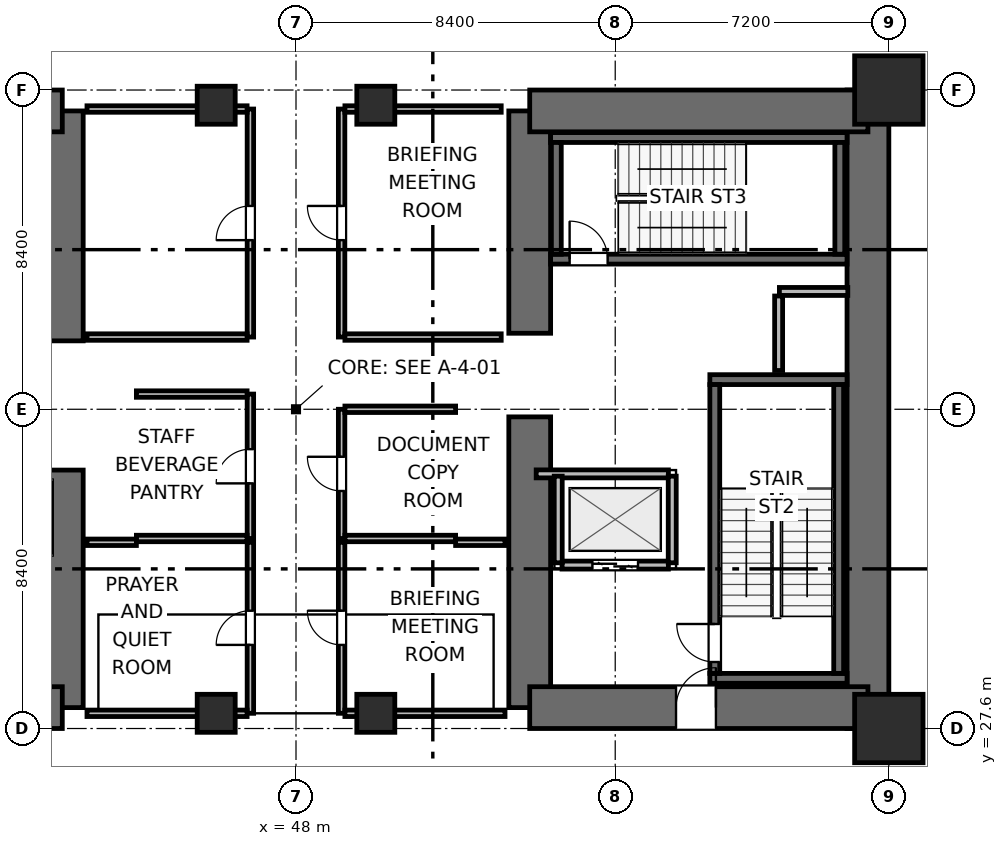
"""IFC4 building model, lengths in metres.
Left out: names, types, materials, properties, quantities, classifications, styles, units other than length and angle.
Written with IfcOpenShell. Run it as: python <this file> out.ifc"""

import sys

from ifc_helpers import new_model, si_unit, direction, frame, frame_2d, origin, origin_2d, place, context, subcontext, project, spatial, rectangle, extrude, element, fill, save


model = new_model("IFC4")
c1 = context("Model", 3, precision=1e-05, world=origin(), true_north=direction((0.0, 1.0)))
c2 = subcontext(c1, "Body", "Model", "MODEL_VIEW")
j1 = project(units=[si_unit("LENGTHUNIT", "METRE"), si_unit("PLANEANGLEUNIT", "RADIAN")], contexts=[c1])
p1 = place(None, origin())
s1 = spatial("IfcSite", under=j1, at=p1, CompositionType="ELEMENT")
p2 = place(p1, origin())
s2 = spatial("IfcBuilding", under=s1, at=p2, CompositionType="ELEMENT")
p3 = place(p2, frame((0.0, 0.0, -9.0)))
s3 = spatial("IfcBuildingStorey", under=s2, at=p3, CompositionType="ELEMENT", Elevation=-9.0)
p4 = place(p3, frame((41.85, 28.15, 0.0), z_axis=(0.0, 0.0, 1.0), x_axis=(0.0, 1.0, 0.0)))
e1 = element("IfcWall", 1, at=p4, inside=s3, PredefinedType="SHEAR", context=c2, shape_type="SweptSolid", body=[
    extrude(rectangle(XDim=6.25, YDim=1.1, at=frame_2d((3.125, 0.0))), origin(), (0.0, 0.0, 1.0), 4.5),
])
p5 = place(p3, frame((41.85, 37.8, 0.0), z_axis=(0.0, 0.0, 1.0), x_axis=(0.0, 1.0, 0.0)))
e2 = element("IfcWall", 2, at=p5, inside=s3, PredefinedType="SHEAR", context=c2, shape_type="SweptSolid", body=[
    extrude(rectangle(XDim=6.05, YDim=1.1, at=frame_2d((3.025, 0.0))), origin(), (0.0, 0.0, 1.0), 4.5),
])
p6 = place(p3, frame((32.95, 28.15, 0.0), z_axis=(0.0, 0.0, 1.0), x_axis=(1.0, 0.0, 0.0)))
e3 = element("IfcWall", 3, at=p6, inside=s3, PredefinedType="SHEAR", context=c2, shape_type="SweptSolid", body=[
    extrude(rectangle(XDim=8.9, YDim=1.1, at=frame_2d((4.45, 0.0))), origin(), (0.0, 0.0, 1.0), 4.5),
])
p7 = place(p6, frame((4.9, 0.0, 0.0)))
e4 = element("IfcOpeningElement", 4, at=p7, cuts=e3, PredefinedType="OPENING", context=c2, shape_type="SweptSolid", body=[
    extrude(rectangle(XDim=1.05, YDim=2.04, at=frame_2d((0.525, 1.02))), frame((0.0, 0.56, 0.0), z_axis=(0.0, -1.0, 0.0), x_axis=(1.0, 0.0, 0.0)), (0.0, 0.0, 1.0), 1.12),
])
p8 = place(p3, frame((32.95, 43.85, 0.0), z_axis=(0.0, 0.0, 1.0), x_axis=(1.0, 0.0, 0.0)))
e5 = element("IfcWall", 5, at=p8, inside=s3, PredefinedType="SHEAR", context=c2, shape_type="SweptSolid", body=[
    extrude(rectangle(XDim=8.9, YDim=1.1, at=frame_2d((4.45, 0.0))), origin(), (0.0, 0.0, 1.0), 4.5),
])
p9 = place(p3, frame((54.15, 28.15, 0.0), z_axis=(0.0, 0.0, 1.0), x_axis=(0.0, 1.0, 0.0)))
e6 = element("IfcWall", 6, at=p9, inside=s3, PredefinedType="SHEAR", context=c2, shape_type="SweptSolid", body=[
    extrude(rectangle(XDim=7.65, YDim=1.1, at=frame_2d((3.825, 0.0))), origin(), (0.0, 0.0, 1.0), 4.5),
])
p10 = place(p3, frame((54.15, 38.0, 0.0), z_axis=(0.0, 0.0, 1.0), x_axis=(0.0, 1.0, 0.0)))
e7 = element("IfcWall", 7, at=p10, inside=s3, PredefinedType="SHEAR", context=c2, shape_type="SweptSolid", body=[
    extrude(rectangle(XDim=5.85, YDim=1.1, at=frame_2d((2.925, 0.0))), origin(), (0.0, 0.0, 1.0), 4.5),
])
p11 = place(p3, frame((63.05, 27.6, 0.0), z_axis=(0.0, 0.0, 1.0), x_axis=(0.0, 1.0, 0.0)))
e8 = element("IfcWall", 8, at=p11, inside=s3, PredefinedType="SHEAR", context=c2, shape_type="SweptSolid", body=[
    extrude(rectangle(XDim=16.8, YDim=1.1, at=frame_2d((8.4, 0.0))), origin(), (0.0, 0.0, 1.0), 4.5),
])
p12 = place(p3, frame((54.15, 28.15, 0.0), z_axis=(0.0, 0.0, 1.0), x_axis=(1.0, 0.0, 0.0)))
e9 = element("IfcWall", 9, at=p12, inside=s3, PredefinedType="SHEAR", context=c2, shape_type="SweptSolid", body=[
    extrude(rectangle(XDim=8.9, YDim=1.1, at=frame_2d((4.45, 0.0))), origin(), (0.0, 0.0, 1.0), 4.5),
])
p13 = place(p12, frame((3.85, 0.0, 0.0)))
e10 = element("IfcOpeningElement", 10, at=p13, cuts=e9, PredefinedType="OPENING", context=c2, shape_type="SweptSolid", body=[
    extrude(rectangle(XDim=1.05, YDim=2.04, at=frame_2d((0.525, 1.02))), frame((0.0, 0.56, 0.0), z_axis=(0.0, -1.0, 0.0), x_axis=(1.0, 0.0, 0.0)), (0.0, 0.0, 1.0), 1.12),
])
p14 = place(p3, frame((54.15, 43.85, 0.0), z_axis=(0.0, 0.0, 1.0), x_axis=(1.0, 0.0, 0.0)))
e11 = element("IfcWall", 11, at=p14, inside=s3, PredefinedType="SHEAR", context=c2, shape_type="SweptSolid", body=[
    extrude(rectangle(XDim=8.9, YDim=1.1, at=frame_2d((4.45, 0.0))), origin(), (0.0, 0.0, 1.0), 4.5),
])
for number, where, z_axis, x_axis in (
    (12, (58.89, 28.92, 0.0), (0.0, 0.0, 1.0), (1.0, 0.0, 0.0)),
    (13, (58.89, 36.78, 0.0), (0.0, 0.0, 1.0), (1.0, 0.0, 0.0)),
):
    element("IfcWall", number, at=place(p3, frame(where, z_axis=z_axis, x_axis=x_axis)), inside=s3, PredefinedType="SHEAR", context=c2, shape_type="SweptSolid", body=[
        extrude(rectangle(XDim=3.61, YDim=0.26, at=frame_2d((1.805, 0.0))), origin(), (0.0, 0.0, 1.0), 4.5),
    ])
p15 = place(p3, frame((59.02, 29.05, 0.0), z_axis=(0.0, 0.0, 1.0), x_axis=(0.0, 1.0, 0.0)))
e14 = element("IfcWall", 14, at=p15, inside=s3, PredefinedType="SHEAR", context=c2, shape_type="SweptSolid", body=[
    extrude(rectangle(XDim=7.6, YDim=0.26, at=frame_2d((3.8, 0.0))), origin(), (0.0, 0.0, 1.0), 4.5),
])
p16 = place(p15, frame((0.3, 0.0, 0.0)))
e15 = element("IfcOpeningElement", 15, at=p16, cuts=e14, PredefinedType="OPENING", context=c2, shape_type="SweptSolid", body=[
    extrude(rectangle(XDim=1.0, YDim=2.04, at=frame_2d((0.5, 1.02))), frame((0.0, 0.14, 0.0), z_axis=(0.0, -1.0, 0.0), x_axis=(1.0, 0.0, 0.0)), (0.0, 0.0, 1.0), 0.28),
])
p17 = place(p3, frame((62.28, 29.05, 0.0), z_axis=(0.0, 0.0, 1.0), x_axis=(0.0, 1.0, 0.0)))
e16 = element("IfcWall", 16, at=p17, inside=s3, PredefinedType="SHEAR", context=c2, shape_type="SweptSolid", body=[
    extrude(rectangle(XDim=7.6, YDim=0.26, at=frame_2d((3.8, 0.0))), origin(), (0.0, 0.0, 1.0), 4.5),
])
p18 = place(p3, frame((54.7, 39.95, 0.0), z_axis=(0.0, 0.0, 1.0), x_axis=(1.0, 0.0, 0.0)))
e17 = element("IfcWall", 17, at=p18, inside=s3, PredefinedType="SHEAR", context=c2, shape_type="SweptSolid", body=[
    extrude(rectangle(XDim=7.8, YDim=0.26, at=frame_2d((3.9, 0.0))), origin(), (0.0, 0.0, 1.0), 4.5),
])
p19 = place(p18, frame((0.5, 0.0, 0.0)))
e18 = element("IfcOpeningElement", 18, at=p19, cuts=e17, PredefinedType="OPENING", context=c2, shape_type="SweptSolid", body=[
    extrude(rectangle(XDim=1.0, YDim=2.04, at=frame_2d((0.5, 1.02))), frame((0.0, 0.14, 0.0), z_axis=(0.0, -1.0, 0.0), x_axis=(1.0, 0.0, 0.0)), (0.0, 0.0, 1.0), 0.28),
])
p20 = place(p3, frame((54.7, 43.15, 0.0), z_axis=(0.0, 0.0, 1.0), x_axis=(1.0, 0.0, 0.0)))
e19 = element("IfcWall", 19, at=p20, inside=s3, PredefinedType="SHEAR", context=c2, shape_type="SweptSolid", body=[
    extrude(rectangle(XDim=7.8, YDim=0.26, at=frame_2d((3.9, 0.0))), origin(), (0.0, 0.0, 1.0), 4.5),
])
for number, where, z_axis, x_axis in (
    (20, (54.85, 40.08, 0.0), (0.0, 0.0, 1.0), (0.0, 1.0, 0.0)),
    (21, (62.31, 40.08, 0.0), (0.0, 0.0, 1.0), (0.0, 1.0, 0.0)),
):
    element("IfcWall", number, at=place(p3, frame(where, z_axis=z_axis, x_axis=x_axis)), inside=s3, PredefinedType="SHEAR", context=c2, shape_type="SweptSolid", body=[
        extrude(rectangle(XDim=2.94, YDim=0.26, at=frame_2d((1.47, 0.0))), origin(), (0.0, 0.0, 1.0), 4.5),
    ])
for number, where, z_axis, x_axis in (
    (22, (63.6, 27.6, 0.0), (0.0, 0.0, 1.0), (1.0, 0.0, 0.0)),
    (23, (63.6, 44.4, 0.0), (0.0, 0.0, 1.0), (1.0, 0.0, 0.0)),
):
    element("IfcColumn", number, at=place(p3, frame(where, z_axis=z_axis, x_axis=x_axis)), inside=s3, PredefinedType="COLUMN", context=c2, shape_type="SweptSolid", body=[
        extrude(rectangle(XDim=1.8, YDim=1.8, at=origin_2d()), origin(), (0.0, 0.0, 1.0), 4.5),
    ])
for number, where, z_axis, x_axis in (
    (24, (45.9, 28.0, 0.0), (0.0, 0.0, 1.0), (1.0, 0.0, 0.0)),
    (25, (50.1, 28.0, 0.0), (0.0, 0.0, 1.0), (1.0, 0.0, 0.0)),
    (26, (45.9, 44.0, 0.0), (0.0, 0.0, 1.0), (1.0, 0.0, 0.0)),
    (27, (50.1, 44.0, 0.0), (0.0, 0.0, 1.0), (1.0, 0.0, 0.0)),
):
    element("IfcColumn", number, at=place(p3, frame(where, z_axis=z_axis, x_axis=x_axis)), inside=s3, PredefinedType="COLUMN", context=c2, shape_type="SweptSolid", body=[
        extrude(rectangle(XDim=1.0, YDim=1.0, at=origin_2d()), origin(), (0.0, 0.0, 1.0), 4.5),
    ])
p21 = place(p3, frame((60.72, 39.1, 0.0), z_axis=(0.0, 0.0, 1.0), x_axis=(1.0, 0.0, 0.0)))
e28 = element("IfcWall", 28, at=p21, inside=s3, PredefinedType="PARTITIONING", context=c2, shape_type="SweptSolid", body=[
    extrude(rectangle(XDim=1.8, YDim=0.21, at=frame_2d((0.9, 0.0))), origin(), (0.0, 0.0, 1.0), 4.18),
])
p22 = place(p3, frame((60.7, 37.02, 0.0), z_axis=(0.0, 0.0, 1.0), x_axis=(0.0, 1.0, 0.0)))
e29 = element("IfcWall", 29, at=p22, inside=s3, PredefinedType="PARTITIONING", context=c2, shape_type="SweptSolid", body=[
    extrude(rectangle(XDim=1.96, YDim=0.21, at=frame_2d((0.98, 0.0))), origin(), (0.0, 0.0, 1.0), 4.18),
])
p23 = place(p3, frame((55.0, 31.9, 0.0), z_axis=(0.0, 0.0, 1.0), x_axis=(1.0, 0.0, 0.0)))
e30 = element("IfcWall", 30, at=p23, inside=s3, PredefinedType="PARTITIONING", context=c2, shape_type="SweptSolid", body=[
    extrude(rectangle(XDim=2.8, YDim=0.21, at=frame_2d((1.4, 0.0))), origin(), (0.0, 0.0, 1.0), 4.18),
])
p24 = place(p23, frame((0.8, 0.0, 0.0)))
e31 = element("IfcOpeningElement", 31, at=p24, cuts=e30, PredefinedType="OPENING", context=c2, shape_type="SweptSolid", body=[
    extrude(rectangle(XDim=1.2, YDim=2.04, at=frame_2d((0.6, 1.02))), frame((0.0, 0.115, 0.0), z_axis=(0.0, -1.0, 0.0), x_axis=(1.0, 0.0, 0.0)), (0.0, 0.0, 1.0), 0.23),
])
p25 = place(p3, frame((54.32, 34.3, 0.0), z_axis=(0.0, 0.0, 1.0), x_axis=(1.0, 0.0, 0.0)))
e32 = element("IfcWall", 32, at=p25, inside=s3, PredefinedType="PARTITIONING", context=c2, shape_type="SweptSolid", body=[
    extrude(rectangle(XDim=3.48, YDim=0.21, at=frame_2d((1.74, 0.0))), origin(), (0.0, 0.0, 1.0), 4.18),
])
for number, where, z_axis, x_axis in (
    (33, (54.9, 31.96, 0.0), (0.0, 0.0, 1.0), (0.0, 1.0, 0.0)),
    (34, (57.9, 31.96, 0.0), (0.0, 0.0, 1.0), (0.0, 1.0, 0.0)),
):
    element("IfcWall", number, at=place(p3, frame(where, z_axis=z_axis, x_axis=x_axis)), inside=s3, PredefinedType="PARTITIONING", context=c2, shape_type="SweptSolid", body=[
        extrude(rectangle(XDim=2.28, YDim=0.21, at=frame_2d((1.14, 0.0))), origin(), (0.0, 0.0, 1.0), 4.18),
    ])
p26 = place(p3, frame((46.8, 32.6, 0.0), z_axis=(0.0, 0.0, 1.0), x_axis=(0.0, 1.0, 0.0)))
e35 = element("IfcWall", 35, at=p26, inside=s3, PredefinedType="PARTITIONING", context=c2, shape_type="SweptSolid", body=[
    extrude(rectangle(XDim=3.8, YDim=0.17, at=frame_2d((1.9, 0.0))), origin(), (0.0, 0.0, 1.0), 4.18),
])
p27 = place(p26, frame((1.45, 0.0, 0.0)))
e36 = element("IfcOpeningElement", 36, at=p27, cuts=e35, PredefinedType="OPENING", context=c2, shape_type="SweptSolid", body=[
    extrude(rectangle(XDim=0.9, YDim=2.02, at=frame_2d((0.45, 1.01))), frame((0.0, 0.095, 0.0), z_axis=(0.0, -1.0, 0.0), x_axis=(1.0, 0.0, 0.0)), (0.0, 0.0, 1.0), 0.19),
])
for number, where, z_axis, x_axis in (
    (37, (43.8, 32.6, 0.0), (0.0, 0.0, 1.0), (1.0, 0.0, 0.0)),
    (38, (43.8, 36.4, 0.0), (0.0, 0.0, 1.0), (1.0, 0.0, 0.0)),
):
    element("IfcWall", number, at=place(p3, frame(where, z_axis=z_axis, x_axis=x_axis)), inside=s3, PredefinedType="PARTITIONING", context=c2, shape_type="SweptSolid", body=[
        extrude(rectangle(XDim=2.913, YDim=0.17, at=frame_2d((1.457, 0.0))), origin(), (0.0, 0.0, 1.0), 4.18),
    ])
p28 = place(p3, frame((49.2, 32.6, 0.0), z_axis=(0.0, 0.0, 1.0), x_axis=(0.0, 1.0, 0.0)))
e39 = element("IfcWall", 39, at=p28, inside=s3, PredefinedType="PARTITIONING", context=c2, shape_type="SweptSolid", body=[
    extrude(rectangle(XDim=3.4, YDim=0.17, at=frame_2d((1.7, 0.0))), origin(), (0.0, 0.0, 1.0), 4.18),
])
p29 = place(p28, frame((1.25, 0.0, 0.0)))
e40 = element("IfcOpeningElement", 40, at=p29, cuts=e39, PredefinedType="OPENING", context=c2, shape_type="SweptSolid", body=[
    extrude(rectangle(XDim=0.9, YDim=2.02, at=frame_2d((0.45, 1.01))), frame((0.0, 0.095, 0.0), z_axis=(0.0, -1.0, 0.0), x_axis=(1.0, 0.0, 0.0)), (0.0, 0.0, 1.0), 0.19),
])
for number, where, z_axis, x_axis in (
    (41, (49.287, 32.6, 0.0), (0.0, 0.0, 1.0), (1.0, 0.0, 0.0)),
    (42, (49.287, 36.0, 0.0), (0.0, 0.0, 1.0), (1.0, 0.0, 0.0)),
):
    element("IfcWall", number, at=place(p3, frame(where, z_axis=z_axis, x_axis=x_axis)), inside=s3, PredefinedType="PARTITIONING", context=c2, shape_type="SweptSolid", body=[
        extrude(rectangle(XDim=2.913, YDim=0.17, at=frame_2d((1.457, 0.0))), origin(), (0.0, 0.0, 1.0), 4.18),
    ])
p30 = place(p3, frame((46.8, 28.0, 0.0), z_axis=(0.0, 0.0, 1.0), x_axis=(0.0, 1.0, 0.0)))
e43 = element("IfcWall", 43, at=p30, inside=s3, PredefinedType="PARTITIONING", context=c2, shape_type="SweptSolid", body=[
    extrude(rectangle(XDim=4.5, YDim=0.17, at=frame_2d((2.25, 0.0))), origin(), (0.0, 0.0, 1.0), 4.18),
])
p31 = place(p30, frame((1.8, 0.0, 0.0)))
e44 = element("IfcOpeningElement", 44, at=p31, cuts=e43, PredefinedType="OPENING", context=c2, shape_type="SweptSolid", body=[
    extrude(rectangle(XDim=0.9, YDim=2.02, at=frame_2d((0.45, 1.01))), frame((0.0, 0.095, 0.0), z_axis=(0.0, -1.0, 0.0), x_axis=(1.0, 0.0, 0.0)), (0.0, 0.0, 1.0), 0.19),
])
p32 = place(p3, frame((42.5, 28.0, 0.0), z_axis=(0.0, 0.0, 1.0), x_axis=(1.0, 0.0, 0.0)))
e45 = element("IfcWall", 45, at=p32, inside=s3, PredefinedType="PARTITIONING", context=c2, shape_type="SweptSolid", body=[
    extrude(rectangle(XDim=4.213, YDim=0.17, at=frame_2d((2.106, 0.0))), origin(), (0.0, 0.0, 1.0), 3.065),
])
p33 = place(p3, frame((42.5, 32.5, 0.0), z_axis=(0.0, 0.0, 1.0), x_axis=(1.0, 0.0, 0.0)))
e46 = element("IfcWall", 46, at=p33, inside=s3, PredefinedType="PARTITIONING", context=c2, shape_type="SweptSolid", body=[
    extrude(rectangle(XDim=1.3, YDim=0.17, at=frame_2d((0.65, 0.0))), origin(), (0.0, 0.0, 1.0), 4.18),
])
p34 = place(p3, frame((49.2, 28.0, 0.0), z_axis=(0.0, 0.0, 1.0), x_axis=(0.0, 1.0, 0.0)))
e47 = element("IfcWall", 47, at=p34, inside=s3, PredefinedType="PARTITIONING", context=c2, shape_type="SweptSolid", body=[
    extrude(rectangle(XDim=4.5, YDim=0.17, at=frame_2d((2.25, 0.0))), origin(), (0.0, 0.0, 1.0), 4.18),
])
p35 = place(p34, frame((1.8, 0.0, 0.0)))
e48 = element("IfcOpeningElement", 48, at=p35, cuts=e47, PredefinedType="OPENING", context=c2, shape_type="SweptSolid", body=[
    extrude(rectangle(XDim=0.9, YDim=2.02, at=frame_2d((0.45, 1.01))), frame((0.0, 0.095, 0.0), z_axis=(0.0, -1.0, 0.0), x_axis=(1.0, 0.0, 0.0)), (0.0, 0.0, 1.0), 0.19),
])
p36 = place(p3, frame((49.287, 28.0, 0.0), z_axis=(0.0, 0.0, 1.0), x_axis=(1.0, 0.0, 0.0)))
e49 = element("IfcWall", 49, at=p36, inside=s3, PredefinedType="PARTITIONING", context=c2, shape_type="SweptSolid", body=[
    extrude(rectangle(XDim=4.213, YDim=0.17, at=frame_2d((2.106, 0.0))), origin(), (0.0, 0.0, 1.0), 3.065),
])
p37 = place(p3, frame((52.2, 32.5, 0.0), z_axis=(0.0, 0.0, 1.0), x_axis=(1.0, 0.0, 0.0)))
e50 = element("IfcWall", 50, at=p37, inside=s3, PredefinedType="PARTITIONING", context=c2, shape_type="SweptSolid", body=[
    extrude(rectangle(XDim=1.3, YDim=0.17, at=frame_2d((0.65, 0.0))), origin(), (0.0, 0.0, 1.0), 4.18),
])
p38 = place(p3, frame((46.8, 37.9, 0.0), z_axis=(0.0, 0.0, 1.0), x_axis=(0.0, 1.0, 0.0)))
e51 = element("IfcWall", 51, at=p38, inside=s3, PredefinedType="PARTITIONING", context=c2, shape_type="SweptSolid", body=[
    extrude(rectangle(XDim=6.0, YDim=0.17, at=frame_2d((3.0, 0.0))), origin(), (0.0, 0.0, 1.0), 4.18),
])
p39 = place(p38, frame((2.55, 0.0, 0.0)))
e52 = element("IfcOpeningElement", 52, at=p39, cuts=e51, PredefinedType="OPENING", context=c2, shape_type="SweptSolid", body=[
    extrude(rectangle(XDim=0.9, YDim=2.02, at=frame_2d((0.45, 1.01))), frame((0.0, 0.095, 0.0), z_axis=(0.0, -1.0, 0.0), x_axis=(1.0, 0.0, 0.0)), (0.0, 0.0, 1.0), 0.19),
])
p40 = place(p3, frame((42.5, 37.9, 0.0), z_axis=(0.0, 0.0, 1.0), x_axis=(1.0, 0.0, 0.0)))
e53 = element("IfcWall", 53, at=p40, inside=s3, PredefinedType="PARTITIONING", context=c2, shape_type="SweptSolid", body=[
    extrude(rectangle(XDim=4.213, YDim=0.17, at=frame_2d((2.106, 0.0))), origin(), (0.0, 0.0, 1.0), 4.18),
])
p41 = place(p3, frame((42.5, 43.9, 0.0), z_axis=(0.0, 0.0, 1.0), x_axis=(1.0, 0.0, 0.0)))
e54 = element("IfcWall", 54, at=p41, inside=s3, PredefinedType="PARTITIONING", context=c2, shape_type="SweptSolid", body=[
    extrude(rectangle(XDim=4.213, YDim=0.17, at=frame_2d((2.106, 0.0))), origin(), (0.0, 0.0, 1.0), 3.065),
])
p42 = place(p3, frame((49.2, 37.9, 0.0), z_axis=(0.0, 0.0, 1.0), x_axis=(0.0, 1.0, 0.0)))
e55 = element("IfcWall", 55, at=p42, inside=s3, PredefinedType="PARTITIONING", context=c2, shape_type="SweptSolid", body=[
    extrude(rectangle(XDim=6.0, YDim=0.17, at=frame_2d((3.0, 0.0))), origin(), (0.0, 0.0, 1.0), 4.18),
])
p43 = place(p42, frame((2.55, 0.0, 0.0)))
e56 = element("IfcOpeningElement", 56, at=p43, cuts=e55, PredefinedType="OPENING", context=c2, shape_type="SweptSolid", body=[
    extrude(rectangle(XDim=0.9, YDim=2.02, at=frame_2d((0.45, 1.01))), frame((0.0, 0.095, 0.0), z_axis=(0.0, -1.0, 0.0), x_axis=(1.0, 0.0, 0.0)), (0.0, 0.0, 1.0), 0.19),
])
p44 = place(p3, frame((49.287, 37.9, 0.0), z_axis=(0.0, 0.0, 1.0), x_axis=(1.0, 0.0, 0.0)))
e57 = element("IfcWall", 57, at=p44, inside=s3, PredefinedType="PARTITIONING", context=c2, shape_type="SweptSolid", body=[
    extrude(rectangle(XDim=4.113, YDim=0.17, at=frame_2d((2.056, 0.0))), origin(), (0.0, 0.0, 1.0), 4.18),
])
p45 = place(p3, frame((49.287, 43.9, 0.0), z_axis=(0.0, 0.0, 1.0), x_axis=(1.0, 0.0, 0.0)))
e58 = element("IfcWall", 58, at=p45, inside=s3, PredefinedType="PARTITIONING", context=c2, shape_type="SweptSolid", body=[
    extrude(rectangle(XDim=4.113, YDim=0.17, at=frame_2d((2.056, 0.0))), origin(), (0.0, 0.0, 1.0), 3.065),
])
p46 = place(p16, origin())
e59 = element("IfcDoor", 59, at=p46, inside=s3, OperationType="SINGLE_SWING_RIGHT", PredefinedType="DOOR", context=c2, shape_type="SweptSolid", body=[
    extrude(rectangle(XDim=1.0, YDim=2.04, at=frame_2d((0.5, 1.02))), frame((0.0, 0.025, 0.0), z_axis=(0.0, -1.0, 0.0), x_axis=(1.0, 0.0, 0.0)), (0.0, 0.0, 1.0), 0.05),
])
fill(e15, e59)
p47 = place(p19, origin())
e60 = element("IfcDoor", 60, at=p47, inside=s3, OperationType="SINGLE_SWING_LEFT", PredefinedType="DOOR", context=c2, shape_type="SweptSolid", body=[
    extrude(rectangle(XDim=1.0, YDim=2.04, at=frame_2d((0.5, 1.02))), frame((0.0, 0.025, 0.0), z_axis=(0.0, -1.0, 0.0), x_axis=(1.0, 0.0, 0.0)), (0.0, 0.0, 1.0), 0.05),
])
fill(e18, e60)
p48 = place(p24, origin())
e61 = element("IfcDoor", 61, at=p48, inside=s3, OperationType="DOUBLE_DOOR_SLIDING", PredefinedType="DOOR", context=c2, shape_type="SweptSolid", body=[
    extrude(rectangle(XDim=1.2, YDim=2.04, at=frame_2d((0.6, 1.02))), frame((0.0, 0.025, 0.0), z_axis=(0.0, -1.0, 0.0), x_axis=(1.0, 0.0, 0.0)), (0.0, 0.0, 1.0), 0.05),
])
fill(e31, e61)
p49 = place(p13, origin())
e62 = element("IfcDoor", 62, at=p49, inside=s3, OperationType="SINGLE_SWING_RIGHT", PredefinedType="DOOR", context=c2, shape_type="SweptSolid", body=[
    extrude(rectangle(XDim=1.05, YDim=2.04, at=frame_2d((0.525, 1.02))), frame((0.0, 0.025, 0.0), z_axis=(0.0, -1.0, 0.0), x_axis=(1.0, 0.0, 0.0)), (0.0, 0.0, 1.0), 0.05),
])
fill(e10, e62)
p50 = place(p27, origin())
e63 = element("IfcDoor", 63, at=p50, inside=s3, OperationType="SINGLE_SWING_LEFT", PredefinedType="DOOR", context=c2, shape_type="SweptSolid", body=[
    extrude(rectangle(XDim=0.9, YDim=2.02, at=frame_2d((0.45, 1.01))), frame((0.0, 0.025, 0.0), z_axis=(0.0, -1.0, 0.0), x_axis=(1.0, 0.0, 0.0)), (0.0, 0.0, 1.0), 0.05),
])
fill(e36, e63)
p51 = place(p29, origin())
e64 = element("IfcDoor", 64, at=p51, inside=s3, OperationType="SINGLE_SWING_RIGHT", PredefinedType="DOOR", context=c2, shape_type="SweptSolid", body=[
    extrude(rectangle(XDim=0.9, YDim=2.02, at=frame_2d((0.45, 1.01))), frame((0.0, 0.025, 0.0), z_axis=(0.0, -1.0, 0.0), x_axis=(1.0, 0.0, 0.0)), (0.0, 0.0, 1.0), 0.05),
])
fill(e40, e64)
p52 = place(p31, origin())
e65 = element("IfcDoor", 65, at=p52, inside=s3, OperationType="SINGLE_SWING_LEFT", PredefinedType="DOOR", context=c2, shape_type="SweptSolid", body=[
    extrude(rectangle(XDim=0.9, YDim=2.02, at=frame_2d((0.45, 1.01))), frame((0.0, 0.025, 0.0), z_axis=(0.0, -1.0, 0.0), x_axis=(1.0, 0.0, 0.0)), (0.0, 0.0, 1.0), 0.05),
])
fill(e44, e65)
p53 = place(p35, origin())
e66 = element("IfcDoor", 66, at=p53, inside=s3, OperationType="SINGLE_SWING_RIGHT", PredefinedType="DOOR", context=c2, shape_type="SweptSolid", body=[
    extrude(rectangle(XDim=0.9, YDim=2.02, at=frame_2d((0.45, 1.01))), frame((0.0, 0.025, 0.0), z_axis=(0.0, -1.0, 0.0), x_axis=(1.0, 0.0, 0.0)), (0.0, 0.0, 1.0), 0.05),
])
fill(e48, e66)
p54 = place(p39, origin())
e67 = element("IfcDoor", 67, at=p54, inside=s3, OperationType="SINGLE_SWING_LEFT", PredefinedType="DOOR", context=c2, shape_type="SweptSolid", body=[
    extrude(rectangle(XDim=0.9, YDim=2.02, at=frame_2d((0.45, 1.01))), frame((0.0, 0.025, 0.0), z_axis=(0.0, -1.0, 0.0), x_axis=(1.0, 0.0, 0.0)), (0.0, 0.0, 1.0), 0.05),
])
fill(e52, e67)
p55 = place(p43, origin())
e68 = element("IfcDoor", 68, at=p55, inside=s3, OperationType="SINGLE_SWING_RIGHT", PredefinedType="DOOR", context=c2, shape_type="SweptSolid", body=[
    extrude(rectangle(XDim=0.9, YDim=2.02, at=frame_2d((0.45, 1.01))), frame((0.0, 0.025, 0.0), z_axis=(0.0, -1.0, 0.0), x_axis=(1.0, 0.0, 0.0)), (0.0, 0.0, 1.0), 0.05),
])
fill(e56, e68)
save(model, sys.argv[1])
